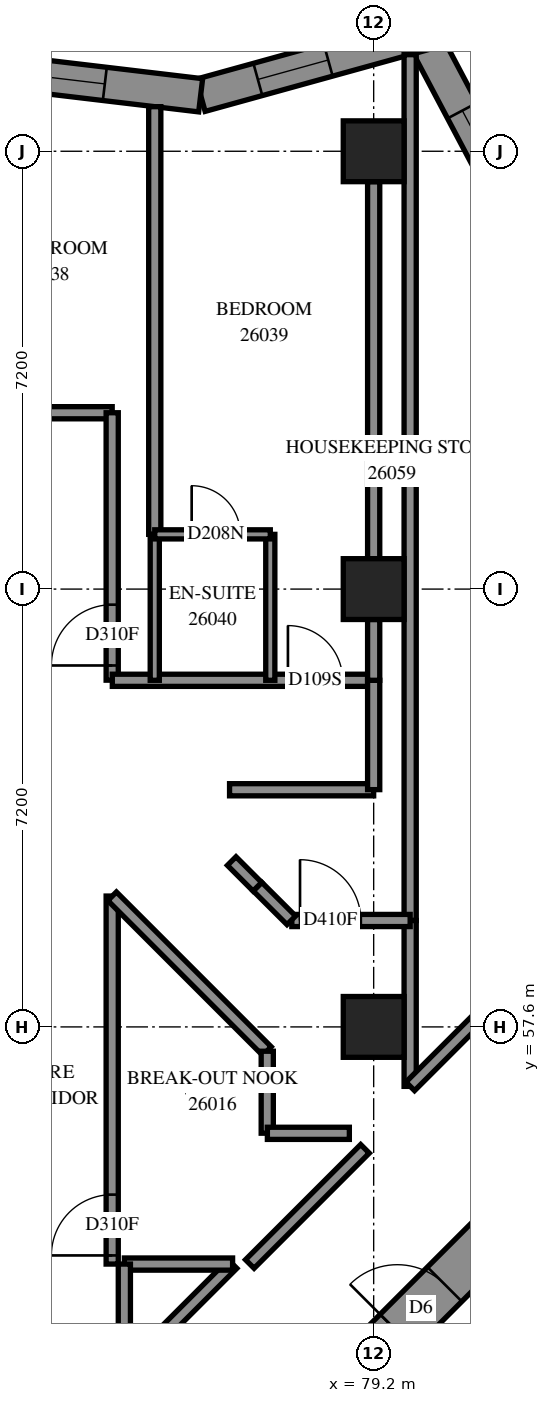
"""IFC4 building model, lengths in metres.
Left out: names, types, materials, properties, quantities, classifications, styles, units other than length and angle.
Written with IfcOpenShell. Run it as: python <this file> out.ifc"""

import sys

from ifc_helpers import new_model, si_unit, direction, frame, frame_2d, origin, origin_2d, place, context, subcontext, project, spatial, polyline, rectangle, outline, extrude, element, fill, save


model = new_model("IFC4")
c1 = context("Model", 3, precision=1e-05, world=origin(), true_north=direction((0.0, 1.0)))
c2 = subcontext(c1, "Body", "Model", "MODEL_VIEW")
j1 = project(units=[si_unit("LENGTHUNIT", "METRE"), si_unit("PLANEANGLEUNIT", "RADIAN")], contexts=[c1])
p1 = place(None, origin())
s1 = spatial("IfcSite", under=j1, at=p1, CompositionType="ELEMENT")
p2 = place(p1, origin())
s2 = spatial("IfcBuilding", under=s1, at=p2, CompositionType="ELEMENT")
p3 = place(p2, frame((0.0, 0.0, 98.2)))
s3 = spatial("IfcBuildingStorey", under=s2, at=p3, CompositionType="ELEMENT", Elevation=98.2)
for number, where, z_axis, x_axis in (
    (1, (79.2, 57.6, 0.0), (0.0, 0.0, 1.0), (1.0, 0.0, 0.0)),
    (2, (79.2, 64.8, 0.0), (0.0, 0.0, 1.0), (1.0, 0.0, 0.0)),
    (3, (79.2, 72.0, 0.0), (0.0, 0.0, 1.0), (1.0, 0.0, 0.0)),
):
    element("IfcColumn", number, at=place(p3, frame(where, z_axis=z_axis, x_axis=x_axis)), inside=s3, PredefinedType="COLUMN", context=c2, shape_type="SweptSolid", body=[
        extrude(rectangle(XDim=1.0, YDim=1.0, at=origin_2d()), origin(), (0.0, 0.0, 1.0), 3.1),
    ])
p4 = place(p3, frame((76.372, 49.373, -0.3), z_axis=(0.0, 0.0, 1.0), x_axis=(0.7071067812, 0.7071067812, 0.0)))
e4 = element("IfcWall", 4, at=p4, inside=s3, PredefinedType="SHEAR", context=c2, shape_type="SweptSolid", body=[
    extrude(rectangle(XDim=14.4, YDim=0.8, at=frame_2d((7.2, 0.0))), origin(), (0.0, 0.0, 1.0), 2.7),
])
p5 = place(p4, frame((4.55, 0.0, 0.3)))
e5 = element("IfcOpeningElement", 5, at=p5, cuts=e4, PredefinedType="OPENING", context=c2, shape_type="SweptSolid", body=[
    extrude(rectangle(XDim=1.1, YDim=2.1, at=frame_2d((0.55, 1.05))), frame((0.0, 0.41, 0.0), z_axis=(0.0, -1.0, 0.0), x_axis=(1.0, 0.0, 0.0)), (0.0, 0.0, 1.0), 0.82),
])
p6 = place(p4, frame((11.35, 0.0, 0.3)))
e6 = element("IfcOpeningElement", 6, at=p6, cuts=e4, PredefinedType="OPENING", context=c2, shape_type="SweptSolid", body=[
    extrude(rectangle(XDim=1.1, YDim=2.1, at=frame_2d((0.55, 1.05))), frame((0.0, 0.41, 0.0), z_axis=(0.0, -1.0, 0.0), x_axis=(1.0, 0.0, 0.0)), (0.0, 0.0, 1.0), 0.82),
])
p7 = place(p3, frame((81.585, 70.915, 0.0), z_axis=(0.0, 0.0, 1.0), x_axis=(-0.4674223657, 0.8840341238, 0.0)))
e7 = element("IfcWall", 7, at=p7, inside=s3, PredefinedType="SOLIDWALL", context=c2, shape_type="SweptSolid", body=[
    extrude(outline(polyline([(0.06, -0.275), (3.628, -0.275), (3.186, 0.275), (-0.06, 0.275), (0.06, -0.275)])), origin(), (0.0, 0.0, 1.0), 3.1),
])
p8 = place(p7, frame((0.784, 0.0, 0.5)))
e8 = element("IfcOpeningElement", 8, at=p8, cuts=e7, PredefinedType="OPENING", context=c2, shape_type="SweptSolid", body=[
    extrude(rectangle(XDim=1.2, YDim=2.45, at=frame_2d((0.6, 1.225))), frame((0.0, 0.285, 0.0), z_axis=(0.0, -1.0, 0.0), x_axis=(1.0, 0.0, 0.0)), (0.0, 0.0, 1.0), 0.57),
])
p9 = place(p3, frame((79.993, 73.927, 0.0), z_axis=(0.0, 0.0, 1.0), x_axis=(-0.9637944631, -0.2666462691, 0.0)))
e9 = element("IfcWall", 9, at=p9, inside=s3, PredefinedType="SOLIDWALL", context=c2, shape_type="SweptSolid", body=[
    extrude(outline(polyline([(-0.221, -0.275), (3.721, -0.275), (3.829, 0.275), (0.221, 0.275), (-0.221, -0.275)])), origin(), (0.0, 0.0, 1.0), 3.1),
])
p10 = place(p9, frame((1.599, 0.0, 0.5)))
e10 = element("IfcOpeningElement", 10, at=p10, cuts=e9, PredefinedType="OPENING", context=c2, shape_type="SweptSolid", body=[
    extrude(rectangle(XDim=1.2, YDim=2.45, at=frame_2d((0.6, 1.225))), frame((0.0, 0.285, 0.0), z_axis=(0.0, -1.0, 0.0), x_axis=(1.0, 0.0, 0.0)), (0.0, 0.0, 1.0), 0.57),
])
p11 = place(p3, frame((76.355, 72.921, 0.0), z_axis=(0.0, 0.0, 1.0), x_axis=(-0.9930244072, 0.1179089763, 0.0)))
e11 = element("IfcWall", 11, at=p11, inside=s3, PredefinedType="SOLIDWALL", context=c2, shape_type="SweptSolid", body=[
    extrude(outline(polyline([(0.054, -0.275), (3.88, -0.275), (3.814, 0.275), (-0.054, 0.275), (0.054, -0.275)])), origin(), (0.0, 0.0, 1.0), 3.1),
])
p12 = place(p11, frame((1.587, 0.0, 0.5)))
e12 = element("IfcOpeningElement", 12, at=p12, cuts=e11, PredefinedType="OPENING", context=c2, shape_type="SweptSolid", body=[
    extrude(rectangle(XDim=1.2, YDim=2.45, at=frame_2d((0.6, 1.225))), frame((0.0, 0.285, 0.0), z_axis=(0.0, -1.0, 0.0), x_axis=(1.0, 0.0, 0.0)), (0.0, 0.0, 1.0), 0.57),
])
p13 = place(p3, frame((54.7, 67.7, 0.0), z_axis=(0.0, 0.0, 1.0), x_axis=(1.0, 0.0, 0.0)))
e13 = element("IfcWall", 13, at=p13, inside=s3, PredefinedType="PARTITIONING", context=c2, shape_type="SweptSolid", body=[
    extrude(rectangle(XDim=20.2, YDim=0.2, at=frame_2d((10.1, 0.0))), origin(), (0.0, 0.0, 1.0), 3.1),
])
p14 = place(p13, frame((5.25, 0.0, 0.0)))
e14 = element("IfcOpeningElement", 14, at=p14, cuts=e13, PredefinedType="OPENING", context=c2, shape_type="SweptSolid", body=[
    extrude(rectangle(XDim=0.9, YDim=2.1, at=frame_2d((0.45, 1.05))), frame((0.0, 0.11, 0.0), z_axis=(0.0, -1.0, 0.0), x_axis=(1.0, 0.0, 0.0)), (0.0, 0.0, 1.0), 0.22),
])
p15 = place(p13, frame((6.9, 0.0, 0.0)))
e15 = element("IfcOpeningElement", 15, at=p15, cuts=e13, PredefinedType="OPENING", context=c2, shape_type="SweptSolid", body=[
    extrude(rectangle(XDim=0.9, YDim=2.1, at=frame_2d((0.45, 1.05))), frame((0.0, 0.11, 0.0), z_axis=(0.0, -1.0, 0.0), x_axis=(1.0, 0.0, 0.0)), (0.0, 0.0, 1.0), 0.22),
])
p16 = place(p13, frame((12.45, 0.0, 0.0)))
e16 = element("IfcOpeningElement", 16, at=p16, cuts=e13, PredefinedType="OPENING", context=c2, shape_type="SweptSolid", body=[
    extrude(rectangle(XDim=0.9, YDim=2.1, at=frame_2d((0.45, 1.05))), frame((0.0, 0.11, 0.0), z_axis=(0.0, -1.0, 0.0), x_axis=(1.0, 0.0, 0.0)), (0.0, 0.0, 1.0), 0.22),
])
p17 = place(p13, frame((14.1, 0.0, 0.0)))
e17 = element("IfcOpeningElement", 17, at=p17, cuts=e13, PredefinedType="OPENING", context=c2, shape_type="SweptSolid", body=[
    extrude(rectangle(XDim=0.9, YDim=2.1, at=frame_2d((0.45, 1.05))), frame((0.0, 0.11, 0.0), z_axis=(0.0, -1.0, 0.0), x_axis=(1.0, 0.0, 0.0)), (0.0, 0.0, 1.0), 0.22),
])
p18 = place(p3, frame((79.8, 59.35, 0.0), z_axis=(0.0, 0.0, 1.0), x_axis=(0.0, 1.0, 0.0)))
e18 = element("IfcWall", 18, at=p18, inside=s3, PredefinedType="PARTITIONING", context=c2, shape_type="SweptSolid", body=[
    extrude(rectangle(XDim=14.238, YDim=0.2, at=frame_2d((7.119, 0.0))), origin(), (0.0, 0.0, 1.0), 3.1),
])
p19 = place(p3, frame((75.6, 65.7, 0.0), z_axis=(0.0, 0.0, 1.0), x_axis=(0.0, 1.0, 0.0)))
e19 = element("IfcWall", 19, at=p19, inside=s3, PredefinedType="PARTITIONING", context=c2, shape_type="SweptSolid", body=[
    extrude(rectangle(XDim=7.033, YDim=0.2, at=frame_2d((3.517, 0.0))), origin(), (0.0, 0.0, 1.0), 3.1),
])
p20 = place(p3, frame((79.2, 65.3, 0.0), z_axis=(0.0, 0.0, 1.0), x_axis=(0.0, 1.0, 0.0)))
e20 = element("IfcWall", 20, at=p20, inside=s3, PredefinedType="PARTITIONING", context=c2, shape_type="SweptSolid", body=[
    extrude(rectangle(XDim=6.2, YDim=0.2, at=frame_2d((3.1, 0.0))), origin(), (0.0, 0.0, 1.0), 3.1),
])
p21 = place(p3, frame((74.9, 53.7, 0.0), z_axis=(0.0, 0.0, 1.0), x_axis=(0.0, 1.0, 0.0)))
e21 = element("IfcWall", 21, at=p21, inside=s3, PredefinedType="PARTITIONING", context=c2, shape_type="SweptSolid", body=[
    extrude(rectangle(XDim=6.052, YDim=0.2, at=frame_2d((3.026, 0.0))), origin(), (0.0, 0.0, 1.0), 3.1),
])
p22 = place(p21, frame((0.142, 0.0, 0.0)))
e22 = element("IfcOpeningElement", 22, at=p22, cuts=e21, PredefinedType="OPENING", context=c2, shape_type="SweptSolid", body=[
    extrude(rectangle(XDim=1.0, YDim=2.1, at=frame_2d((0.5, 1.05))), frame((0.0, 0.11, 0.0), z_axis=(0.0, -1.0, 0.0), x_axis=(1.0, 0.0, 0.0)), (0.0, 0.0, 1.0), 0.22),
])
p23 = place(p3, frame((74.9, 63.302, 0.0), z_axis=(0.0, 0.0, 1.0), x_axis=(0.0, 1.0, 0.0)))
e23 = element("IfcWall", 23, at=p23, inside=s3, PredefinedType="PARTITIONING", context=c2, shape_type="SweptSolid", body=[
    extrude(rectangle(XDim=4.398, YDim=0.2, at=frame_2d((2.199, 0.0))), origin(), (0.0, 0.0, 1.0), 3.1),
])
p24 = place(p23, frame((0.242, 0.0, 0.0)))
e24 = element("IfcOpeningElement", 24, at=p24, cuts=e23, PredefinedType="OPENING", context=c2, shape_type="SweptSolid", body=[
    extrude(rectangle(XDim=1.0, YDim=2.1, at=frame_2d((0.5, 1.05))), frame((0.0, 0.11, 0.0), z_axis=(0.0, -1.0, 0.0), x_axis=(1.0, 0.0, 0.0)), (0.0, 0.0, 1.0), 0.22),
])
p25 = place(p3, frame((74.902, 63.3, 0.0), z_axis=(0.0, 0.0, 1.0), x_axis=(1.0, 0.0, 0.0)))
e25 = element("IfcWall", 25, at=p25, inside=s3, PredefinedType="PARTITIONING", context=c2, shape_type="SweptSolid", body=[
    extrude(rectangle(XDim=4.298, YDim=0.2, at=frame_2d((2.149, 0.0))), origin(), (0.0, 0.0, 1.0), 3.1),
])
p26 = place(p25, frame((2.888, 0.0, 0.0)))
e26 = element("IfcOpeningElement", 26, at=p26, cuts=e25, PredefinedType="OPENING", context=c2, shape_type="SweptSolid", body=[
    extrude(rectangle(XDim=0.9, YDim=2.1, at=frame_2d((0.45, 1.05))), frame((0.0, 0.11, 0.0), z_axis=(0.0, -1.0, 0.0), x_axis=(1.0, 0.0, 0.0)), (0.0, 0.0, 1.0), 0.22),
])
p27 = place(p3, frame((74.899, 59.749, 0.0), z_axis=(0.0, 0.0, 1.0), x_axis=(0.7071067812, -0.7071067812, 0.0)))
e27 = element("IfcWall", 27, at=p27, inside=s3, PredefinedType="PARTITIONING", context=c2, shape_type="SweptSolid", body=[
    extrude(rectangle(XDim=3.601, YDim=0.2, at=frame_2d((1.8, 0.0))), origin(), (0.0, 0.0, 1.0), 3.1),
])
p28 = place(p3, frame((79.8, 56.622, 0.0), z_axis=(0.0, 0.0, 1.0), x_axis=(0.0, 1.0, 0.0)))
e28 = element("IfcWall", 28, at=p28, inside=s3, PredefinedType="PARTITIONING", context=c2, shape_type="SweptSolid", body=[
    extrude(rectangle(XDim=2.728, YDim=0.2, at=frame_2d((1.364, 0.0))), origin(), (0.0, 0.0, 1.0), 3.1),
])
p29 = place(p3, frame((77.163, 53.701, 0.0), z_axis=(0.0, 0.0, 1.0), x_axis=(0.7071067812, 0.7071067812, 0.0)))
e29 = element("IfcWall", 29, at=p29, inside=s3, PredefinedType="PARTITIONING", context=c2, shape_type="SweptSolid", body=[
    extrude(rectangle(XDim=2.679, YDim=0.2, at=frame_2d((1.339, 0.0))), origin(), (0.0, 0.0, 1.0), 3.1),
])
p30 = place(p3, frame((75.102, 51.922, 0.0), z_axis=(0.0, 0.0, 1.0), x_axis=(0.7071067812, 0.7071067812, 0.0)))
e30 = element("IfcWall", 30, at=p30, inside=s3, PredefinedType="PARTITIONING", context=c2, shape_type="SweptSolid", body=[
    extrude(rectangle(XDim=2.514, YDim=0.2, at=frame_2d((1.257, 0.0))), origin(), (0.0, 0.0, 1.0), 3.1),
])
for number, where, z_axis, x_axis in (
    (31, (75.6, 63.3, 0.0), (0.0, 0.0, 1.0), (0.0, 1.0, 0.0)),
    (32, (77.5, 63.3, 0.0), (0.0, 0.0, 1.0), (0.0, 1.0, 0.0)),
):
    element("IfcWall", number, at=place(p3, frame(where, z_axis=z_axis, x_axis=x_axis)), inside=s3, PredefinedType="PARTITIONING", context=c2, shape_type="SweptSolid", body=[
        extrude(rectangle(XDim=2.4, YDim=0.15, at=frame_2d((1.2, 0.0))), origin(), (0.0, 0.0, 1.0), 3.1),
    ])
p31 = place(p3, frame((76.83, 61.5, 0.0), z_axis=(0.0, 0.0, 1.0), x_axis=(1.0, 0.0, 0.0)))
e33 = element("IfcWall", 33, at=p31, inside=s3, PredefinedType="PARTITIONING", context=c2, shape_type="SweptSolid", body=[
    extrude(rectangle(XDim=2.37, YDim=0.2, at=frame_2d((1.185, 0.0))), origin(), (0.0, 0.0, 1.0), 3.1),
])
p32 = place(p3, frame((77.854, 59.35, 0.0), z_axis=(0.0, 0.0, 1.0), x_axis=(1.0, 0.0, 0.0)))
e34 = element("IfcWall", 34, at=p32, inside=s3, PredefinedType="PARTITIONING", context=c2, shape_type="SweptSolid", body=[
    extrude(rectangle(XDim=1.946, YDim=0.2, at=frame_2d((0.973, 0.0))), origin(), (0.0, 0.0, 1.0), 3.1),
])
p33 = place(p32, frame((0.135, 0.0, 0.0)))
e35 = element("IfcOpeningElement", 35, at=p33, cuts=e34, PredefinedType="OPENING", context=c2, shape_type="SweptSolid", body=[
    extrude(rectangle(XDim=1.0, YDim=2.1, at=frame_2d((0.5, 1.05))), frame((0.0, 0.11, 0.0), z_axis=(0.0, -1.0, 0.0), x_axis=(1.0, 0.0, 0.0)), (0.0, 0.0, 1.0), 0.22),
])
p34 = place(p3, frame((75.6, 65.7, 0.0), z_axis=(0.0, 0.0, 1.0), x_axis=(1.0, 0.0, 0.0)))
e36 = element("IfcWall", 36, at=p34, inside=s3, PredefinedType="PARTITIONING", context=c2, shape_type="SweptSolid", body=[
    extrude(rectangle(XDim=1.9, YDim=0.15, at=frame_2d((0.95, 0.0))), origin(), (0.0, 0.0, 1.0), 3.1),
])
p35 = place(p34, frame((0.607, 0.0, 0.0)))
e37 = element("IfcOpeningElement", 37, at=p35, cuts=e36, PredefinedType="OPENING", context=c2, shape_type="SweptSolid", body=[
    extrude(rectangle(XDim=0.8, YDim=2.1, at=frame_2d((0.4, 1.05))), frame((0.0, 0.085, 0.0), z_axis=(0.0, -1.0, 0.0), x_axis=(1.0, 0.0, 0.0)), (0.0, 0.0, 1.0), 0.17),
])
p36 = place(p3, frame((79.2, 61.502, 0.0), z_axis=(0.0, 0.0, 1.0), x_axis=(0.0, 1.0, 0.0)))
e38 = element("IfcWall", 38, at=p36, inside=s3, PredefinedType="PARTITIONING", context=c2, shape_type="SweptSolid", body=[
    extrude(rectangle(XDim=1.798, YDim=0.2, at=frame_2d((0.899, 0.0))), origin(), (0.0, 0.0, 1.0), 3.1),
])
p37 = place(p3, frame((75.1, 53.7, 0.0), z_axis=(0.0, 0.0, 1.0), x_axis=(1.0, 0.0, 0.0)))
e39 = element("IfcWall", 39, at=p37, inside=s3, PredefinedType="PARTITIONING", context=c2, shape_type="SweptSolid", body=[
    extrude(rectangle(XDim=1.78, YDim=0.2, at=frame_2d((0.89, 0.0))), origin(), (0.0, 0.0, 1.0), 3.1),
])
p38 = place(p3, frame((75.1, 51.922, 0.0), z_axis=(0.0, 0.0, 1.0), x_axis=(0.0, 1.0, 0.0)))
e40 = element("IfcWall", 40, at=p38, inside=s3, PredefinedType="PARTITIONING", context=c2, shape_type="SweptSolid", body=[
    extrude(rectangle(XDim=1.778, YDim=0.2, at=frame_2d((0.889, 0.0))), origin(), (0.0, 0.0, 1.0), 3.1),
])
p39 = place(p3, frame((79.802, 56.623, 0.0), z_axis=(0.0, 0.0, 1.0), x_axis=(0.7071067812, 0.7071067812, 0.0)))
e41 = element("IfcWall", 41, at=p39, inside=s3, PredefinedType="PARTITIONING", context=c2, shape_type="SweptSolid", body=[
    extrude(rectangle(XDim=1.623, YDim=0.2, at=frame_2d((0.812, 0.0))), origin(), (0.0, 0.0, 1.0), 3.1),
])
for number, where, z_axis, x_axis in (
    (42, (77.45, 55.852, 0.0), (0.0, 0.0, 1.0), (0.0, 1.0, 0.0)),
    (43, (77.452, 55.85, 0.0), (0.0, 0.0, 1.0), (1.0, 0.0, 0.0)),
):
    element("IfcWall", number, at=place(p3, frame(where, z_axis=z_axis, x_axis=x_axis)), inside=s3, PredefinedType="PARTITIONING", context=c2, shape_type="SweptSolid", body=[
        extrude(rectangle(XDim=1.348, YDim=0.2, at=frame_2d((0.674, 0.0))), origin(), (0.0, 0.0, 1.0), 3.1),
    ])
p40 = place(p3, frame((79.2, 63.3, 0.0), z_axis=(0.0, 0.0, 1.0), x_axis=(0.0, 1.0, 0.0)))
e44 = element("IfcWall", 44, at=p40, inside=s3, PredefinedType="PARTITIONING", context=c2, shape_type="SweptSolid", body=[
    extrude(rectangle(XDim=1.0, YDim=0.2, at=frame_2d((0.5, 0.0))), origin(), (0.0, 0.0, 1.0), 3.1),
])
p41 = place(p3, frame((77.289, 59.907, 0.0), z_axis=(0.0, 0.0, 1.0), x_axis=(0.7083796976, -0.7058315692, 0.0)))
e45 = element("IfcWall", 45, at=p41, inside=s3, PredefinedType="PARTITIONING", context=c2, shape_type="SweptSolid", body=[
    extrude(rectangle(XDim=0.785, YDim=0.2, at=frame_2d((0.393, 0.0))), origin(), (0.0, 0.0, 1.0), 3.1),
])
p42 = place(p3, frame((76.865, 60.327, 0.0), z_axis=(0.0, 0.0, 1.0), x_axis=(0.7071067812, -0.7071067812, 0.0)))
e46 = element("IfcWall", 46, at=p42, inside=s3, PredefinedType="PARTITIONING", context=c2, shape_type="SweptSolid", body=[
    extrude(rectangle(XDim=0.597, YDim=0.2, at=frame_2d((0.298, 0.0))), origin(), (0.0, 0.0, 1.0), 3.1),
])
p43 = place(p8, origin())
e47 = element("IfcWindow", 47, at=p43, inside=s3, PartitioningType="SINGLE_PANEL", PredefinedType="WINDOW", context=c2, shape_type="SweptSolid", body=[
    extrude(rectangle(XDim=1.2, YDim=2.45, at=frame_2d((0.6, 1.225))), frame((0.0, 0.155, 0.0), z_axis=(0.0, -1.0, 0.0), x_axis=(1.0, 0.0, 0.0)), (0.0, 0.0, 1.0), 0.06),
])
fill(e8, e47)
p44 = place(p10, origin())
e48 = element("IfcWindow", 48, at=p44, inside=s3, PartitioningType="SINGLE_PANEL", PredefinedType="WINDOW", context=c2, shape_type="SweptSolid", body=[
    extrude(rectangle(XDim=1.2, YDim=2.45, at=frame_2d((0.6, 1.225))), frame((0.0, 0.155, 0.0), z_axis=(0.0, -1.0, 0.0), x_axis=(1.0, 0.0, 0.0)), (0.0, 0.0, 1.0), 0.06),
])
fill(e10, e48)
p45 = place(p12, origin())
e49 = element("IfcWindow", 49, at=p45, inside=s3, PartitioningType="SINGLE_PANEL", PredefinedType="WINDOW", context=c2, shape_type="SweptSolid", body=[
    extrude(rectangle(XDim=1.2, YDim=2.45, at=frame_2d((0.6, 1.225))), frame((0.0, 0.155, 0.0), z_axis=(0.0, -1.0, 0.0), x_axis=(1.0, 0.0, 0.0)), (0.0, 0.0, 1.0), 0.06),
])
fill(e12, e49)
p46 = place(p5, origin())
e50 = element("IfcDoor", 50, at=p46, inside=s3, OperationType="DOUBLE_DOOR_SINGLE_SWING", PredefinedType="DOOR", context=c2, shape_type="SweptSolid", body=[
    extrude(rectangle(XDim=1.1, YDim=2.1, at=frame_2d((0.55, 1.05))), frame((0.0, 0.025, 0.0), z_axis=(0.0, -1.0, 0.0), x_axis=(1.0, 0.0, 0.0)), (0.0, 0.0, 1.0), 0.05),
])
fill(e5, e50)
p47 = place(p22, origin())
e51 = element("IfcDoor", 51, at=p47, inside=s3, OperationType="SINGLE_SWING_LEFT", PredefinedType="DOOR", context=c2, shape_type="SweptSolid", body=[
    extrude(rectangle(XDim=1.0, YDim=2.1, at=frame_2d((0.5, 1.05))), frame((0.0, 0.025, 0.0), z_axis=(0.0, -1.0, 0.0), x_axis=(1.0, 0.0, 0.0)), (0.0, 0.0, 1.0), 0.05),
])
fill(e22, e51)
p48 = place(p24, origin())
e52 = element("IfcDoor", 52, at=p48, inside=s3, OperationType="SINGLE_SWING_RIGHT", PredefinedType="DOOR", context=c2, shape_type="SweptSolid", body=[
    extrude(rectangle(XDim=1.0, YDim=2.1, at=frame_2d((0.5, 1.05))), frame((0.0, 0.025, 0.0), z_axis=(0.0, -1.0, 0.0), x_axis=(1.0, 0.0, 0.0)), (0.0, 0.0, 1.0), 0.05),
])
fill(e24, e52)
p49 = place(p26, origin())
e53 = element("IfcDoor", 53, at=p49, inside=s3, OperationType="SINGLE_SWING_LEFT", PredefinedType="DOOR", context=c2, shape_type="SweptSolid", body=[
    extrude(rectangle(XDim=0.9, YDim=2.1, at=frame_2d((0.45, 1.05))), frame((0.0, 0.025, 0.0), z_axis=(0.0, -1.0, 0.0), x_axis=(1.0, 0.0, 0.0)), (0.0, 0.0, 1.0), 0.05),
])
fill(e26, e53)
p50 = place(p35, origin())
e54 = element("IfcDoor", 54, at=p50, inside=s3, OperationType="SINGLE_SWING_RIGHT", PredefinedType="DOOR", context=c2, shape_type="SweptSolid", body=[
    extrude(rectangle(XDim=0.8, YDim=2.1, at=frame_2d((0.4, 1.05))), frame((0.0, 0.025, 0.0), z_axis=(0.0, -1.0, 0.0), x_axis=(1.0, 0.0, 0.0)), (0.0, 0.0, 1.0), 0.05),
])
fill(e37, e54)
p51 = place(p33, origin())
e55 = element("IfcDoor", 55, at=p51, inside=s3, OperationType="SINGLE_SWING_LEFT", PredefinedType="DOOR", context=c2, shape_type="SweptSolid", body=[
    extrude(rectangle(XDim=1.0, YDim=2.1, at=frame_2d((0.5, 1.05))), frame((0.0, 0.025, 0.0), z_axis=(0.0, -1.0, 0.0), x_axis=(1.0, 0.0, 0.0)), (0.0, 0.0, 1.0), 0.05),
])
fill(e35, e55)
save(model, sys.argv[1])
